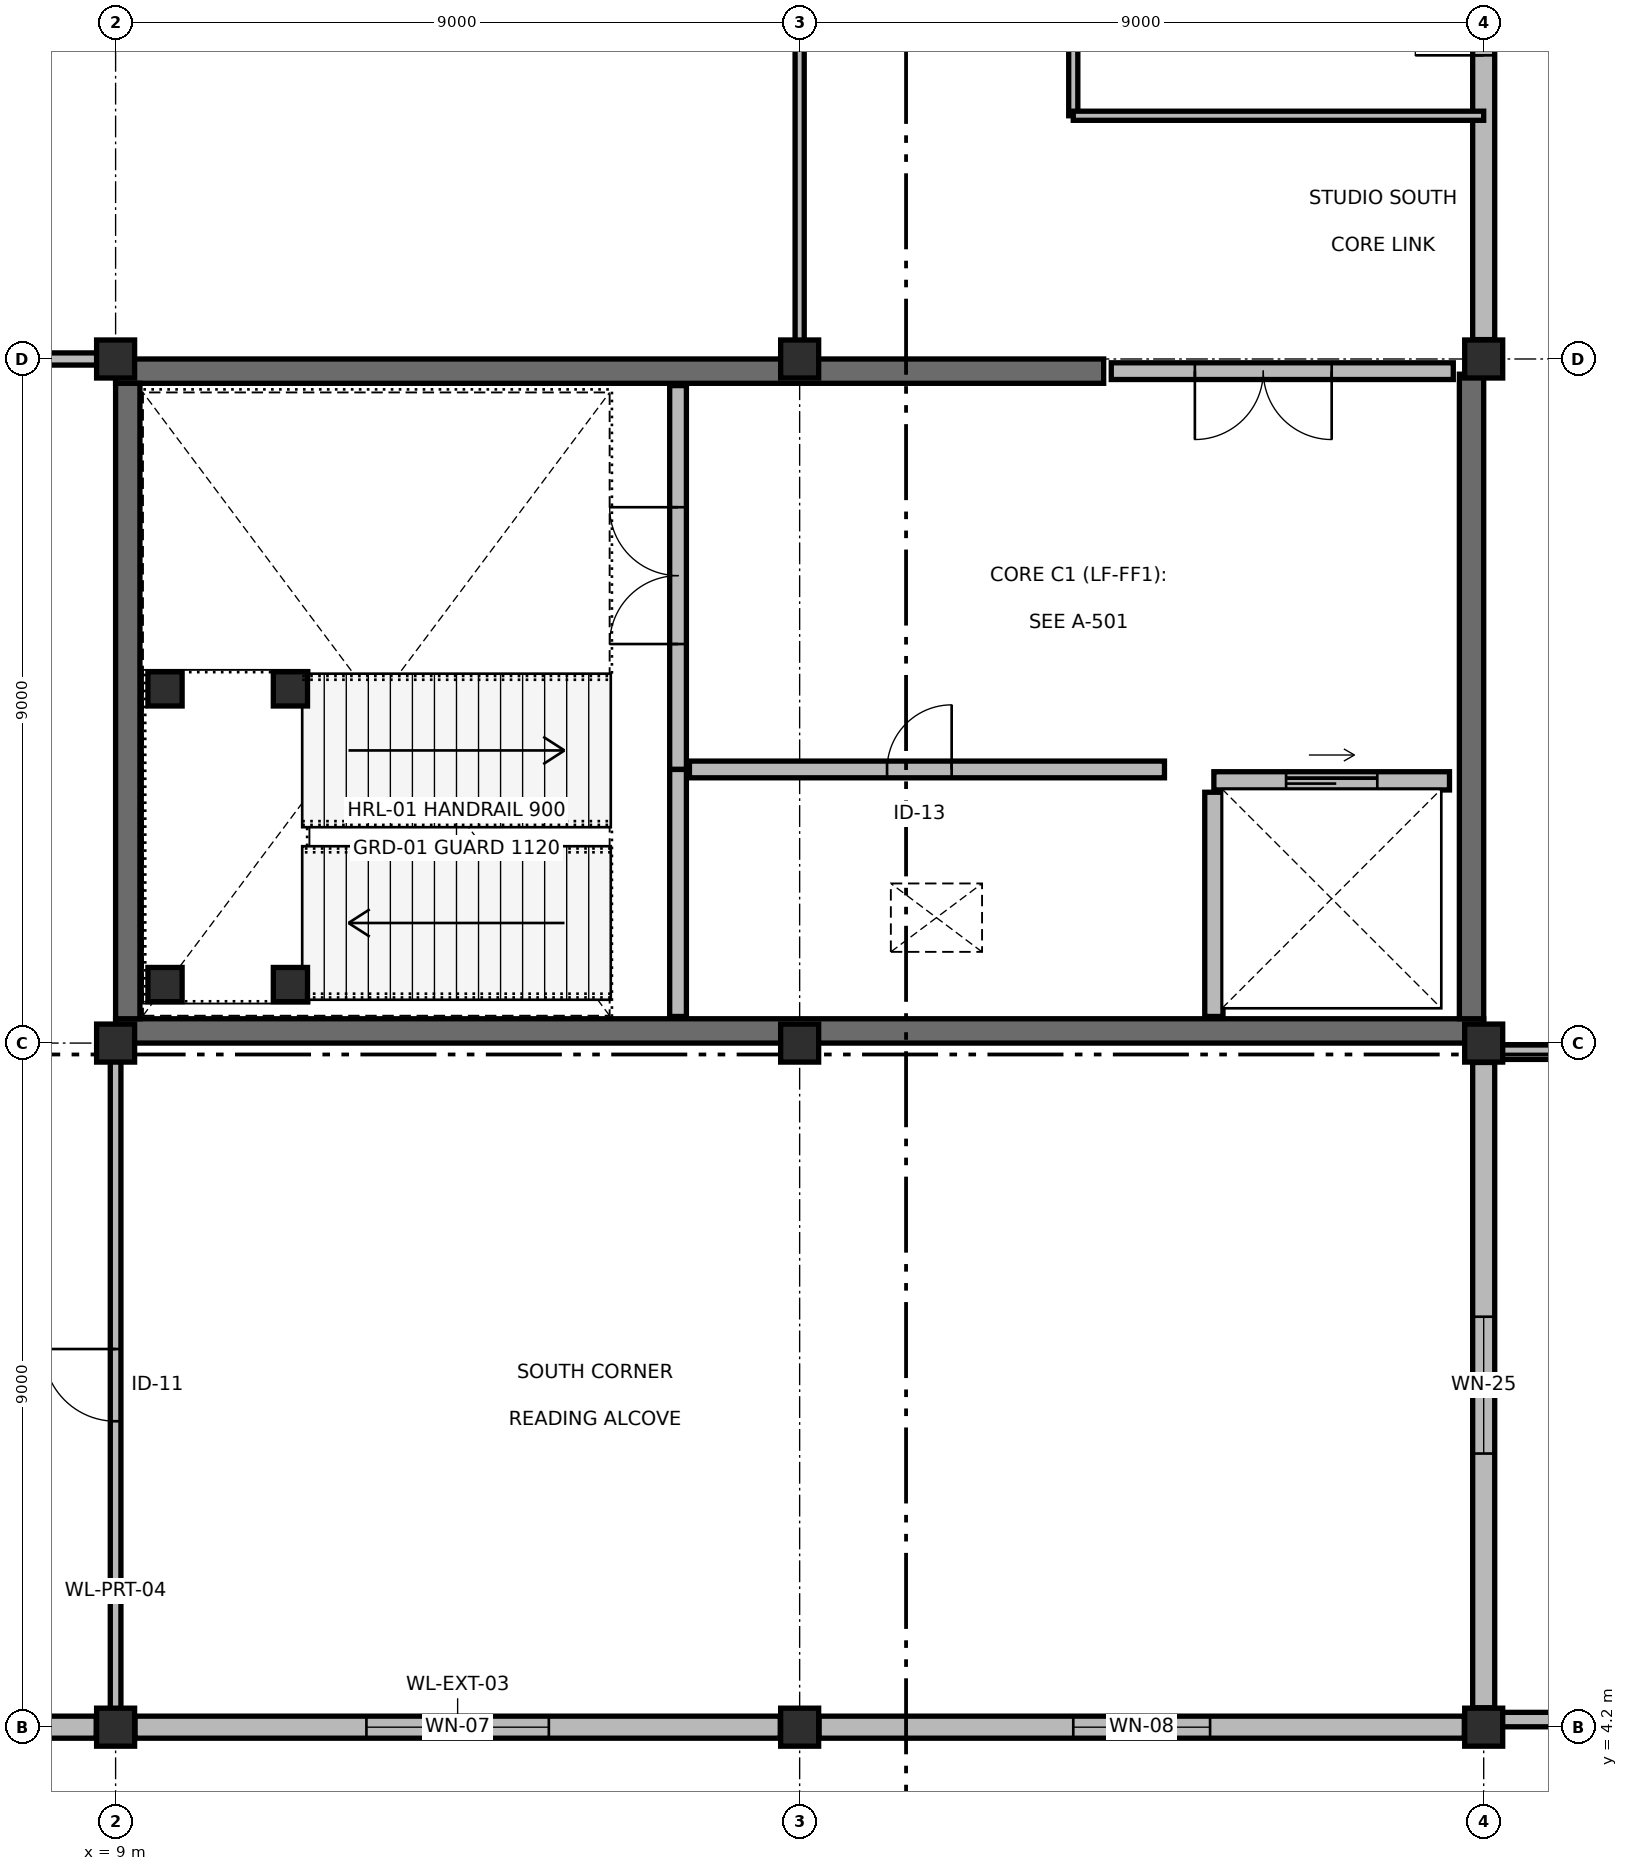
"""IFC4 building model, lengths in metres.
Left out: names, types, materials, properties, quantities, classifications, styles, units other than length and angle.
Written with IfcOpenShell. Run it as: python <this file> out.ifc"""

import sys

from ifc_helpers import new_model, si_unit, direction, frame, frame_2d, origin, origin_2d, place, context, subcontext, project, spatial, rectangle, extrude, element, fill, save


model = new_model("IFC4")
c1 = context("Model", 3, precision=1e-05, world=origin(), true_north=direction((0.0, 1.0)))
c2 = subcontext(c1, "Body", "Model", "MODEL_VIEW")
j1 = project(units=[si_unit("LENGTHUNIT", "METRE"), si_unit("PLANEANGLEUNIT", "RADIAN")], contexts=[c1])
p1 = place(None, origin())
s1 = spatial("IfcSite", under=j1, at=p1, CompositionType="ELEMENT")
p2 = place(p1, origin())
s2 = spatial("IfcBuilding", under=s1, at=p2, CompositionType="ELEMENT")
p3 = place(p2, frame((0.0, 0.0, 14.1)))
s3 = spatial("IfcBuildingStorey", under=s2, at=p3, CompositionType="ELEMENT", Elevation=14.1)
for number, where, z_axis, x_axis in (
    (1, (9.0, 4.2, 0.0), (0.0, 0.0, 1.0), (1.0, 0.0, 0.0)),
    (2, (9.0, 13.2, 0.0), (0.0, 0.0, 1.0), (1.0, 0.0, 0.0)),
    (3, (9.0, 22.2, 0.0), (0.0, 0.0, 1.0), (1.0, 0.0, 0.0)),
    (4, (18.0, 4.2, 0.0), (0.0, 0.0, 1.0), (1.0, 0.0, 0.0)),
    (5, (18.0, 13.2, 0.0), (0.0, 0.0, 1.0), (1.0, 0.0, 0.0)),
    (6, (18.0, 22.2, 0.0), (0.0, 0.0, 1.0), (1.0, 0.0, 0.0)),
    (7, (27.0, 4.2, 0.0), (0.0, 0.0, 1.0), (1.0, 0.0, 0.0)),
    (8, (27.0, 13.2, 0.0), (0.0, 0.0, 1.0), (1.0, 0.0, 0.0)),
    (9, (27.0, 22.2, 0.0), (0.0, 0.0, 1.0), (1.0, 0.0, 0.0)),
):
    element("IfcColumn", number, at=place(p3, frame(where, z_axis=z_axis, x_axis=x_axis)), inside=s3, PredefinedType="COLUMN", context=c2, shape_type="SweptSolid", body=[
        extrude(rectangle(XDim=0.5, YDim=0.5, at=origin_2d()), origin(), (0.0, 0.0, 1.0), 4.5),
    ])
p4 = place(p3, frame((9.0, 13.36, 0.0), z_axis=(0.0, 0.0, 1.0), x_axis=(1.0, 0.0, 0.0)))
e10 = element("IfcWall", 10, at=p4, inside=s3, PredefinedType="SHEAR", context=c2, shape_type="SweptSolid", body=[
    extrude(rectangle(XDim=18.0, YDim=0.32, at=frame_2d((9.0, 0.0))), origin(), (0.0, 0.0, 1.0), 4.5),
])
p5 = place(p3, frame((9.0, 22.04, 0.0), z_axis=(0.0, 0.0, 1.0), x_axis=(1.0, 0.0, 0.0)))
e11 = element("IfcWall", 11, at=p5, inside=s3, PredefinedType="SHEAR", context=c2, shape_type="SweptSolid", body=[
    extrude(rectangle(XDim=13.0, YDim=0.32, at=frame_2d((6.5, 0.0))), origin(), (0.0, 0.0, 1.0), 4.5),
])
p6 = place(p3, frame((9.16, 13.52, 0.0), z_axis=(0.0, 0.0, 1.0), x_axis=(0.0, 1.0, 0.0)))
e12 = element("IfcWall", 12, at=p6, inside=s3, PredefinedType="SHEAR", context=c2, shape_type="SweptSolid", body=[
    extrude(rectangle(XDim=8.36, YDim=0.32, at=frame_2d((4.18, 0.0))), origin(), (0.0, 0.0, 1.0), 4.5),
])
p7 = place(p3, frame((26.84, 13.52, 0.0), z_axis=(0.0, 0.0, 1.0), x_axis=(0.0, 1.0, 0.0)))
e13 = element("IfcWall", 13, at=p7, inside=s3, PredefinedType="SHEAR", context=c2, shape_type="SweptSolid", body=[
    extrude(rectangle(XDim=8.48, YDim=0.32, at=frame_2d((4.24, 0.0))), origin(), (0.0, 0.0, 1.0), 4.5),
])
p8 = place(p3, frame((8.745, 4.2, 0.0), z_axis=(0.0, 0.0, 1.0), x_axis=(-1.0, 0.0, 0.0)))
e14 = element("IfcWall", 14, at=p8, inside=s3, PredefinedType="SOLIDWALL", context=c2, shape_type="SweptSolid", body=[
    extrude(rectangle(XDim=8.49, YDim=0.29, at=frame_2d((4.245, 0.0))), origin(), (0.0, 0.0, 1.0), 3.535),
])
p9 = place(p8, frame((2.745, 0.0, 0.95)))
e15 = element("IfcOpeningElement", 15, at=p9, cuts=e14, PredefinedType="OPENING", context=c2, shape_type="SweptSolid", body=[
    extrude(rectangle(XDim=3.0, YDim=1.2, at=frame_2d((1.5, 0.6))), frame((0.0, 0.155, 0.0), z_axis=(0.0, -1.0, 0.0), x_axis=(1.0, 0.0, 0.0)), (0.0, 0.0, 1.0), 0.31),
])
p10 = place(p3, frame((17.745, 4.2, 0.0), z_axis=(0.0, 0.0, 1.0), x_axis=(-1.0, 0.0, 0.0)))
e16 = element("IfcWall", 16, at=p10, inside=s3, PredefinedType="SOLIDWALL", context=c2, shape_type="SweptSolid", body=[
    extrude(rectangle(XDim=8.49, YDim=0.29, at=frame_2d((4.245, 0.0))), origin(), (0.0, 0.0, 1.0), 3.535),
])
p11 = place(p10, frame((3.045, 0.0, 0.95)))
e17 = element("IfcOpeningElement", 17, at=p11, cuts=e16, PredefinedType="OPENING", context=c2, shape_type="SweptSolid", body=[
    extrude(rectangle(XDim=2.4, YDim=1.2, at=frame_2d((1.2, 0.6))), frame((0.0, 0.155, 0.0), z_axis=(0.0, -1.0, 0.0), x_axis=(1.0, 0.0, 0.0)), (0.0, 0.0, 1.0), 0.31),
])
p12 = place(p3, frame((26.745, 4.2, 0.0), z_axis=(0.0, 0.0, 1.0), x_axis=(-1.0, 0.0, 0.0)))
e18 = element("IfcWall", 18, at=p12, inside=s3, PredefinedType="SOLIDWALL", context=c2, shape_type="SweptSolid", body=[
    extrude(rectangle(XDim=8.49, YDim=0.29, at=frame_2d((4.245, 0.0))), origin(), (0.0, 0.0, 1.0), 3.535),
])
p13 = place(p12, frame((3.345, 0.0, 0.95)))
e19 = element("IfcOpeningElement", 19, at=p13, cuts=e18, PredefinedType="OPENING", context=c2, shape_type="SweptSolid", body=[
    extrude(rectangle(XDim=1.8, YDim=1.2, at=frame_2d((0.9, 0.6))), frame((0.0, 0.155, 0.0), z_axis=(0.0, -1.0, 0.0), x_axis=(1.0, 0.0, 0.0)), (0.0, 0.0, 1.0), 0.31),
])
p14 = place(p3, frame((27.0, 12.945, 0.0), z_axis=(0.0, 0.0, 1.0), x_axis=(0.0, -1.0, 0.0)))
e20 = element("IfcWall", 20, at=p14, inside=s3, PredefinedType="SOLIDWALL", context=c2, shape_type="SweptSolid", body=[
    extrude(rectangle(XDim=8.49, YDim=0.29, at=frame_2d((4.245, 0.0))), origin(), (0.0, 0.0, 1.0), 3.535),
])
p15 = place(p14, frame((3.345, 0.0, 0.85)))
e21 = element("IfcOpeningElement", 21, at=p15, cuts=e20, PredefinedType="OPENING", context=c2, shape_type="SweptSolid", body=[
    extrude(rectangle(XDim=1.8, YDim=2.0, at=frame_2d((0.9, 1.0))), frame((0.0, 0.155, 0.0), z_axis=(0.0, -1.0, 0.0), x_axis=(1.0, 0.0, 0.0)), (0.0, 0.0, 1.0), 0.31),
])
p16 = place(p3, frame((27.0, 28.545, 0.0), z_axis=(0.0, 0.0, 1.0), x_axis=(0.0, -1.0, 0.0)))
e22 = element("IfcWall", 22, at=p16, inside=s3, PredefinedType="SOLIDWALL", context=c2, shape_type="SweptSolid", body=[
    extrude(rectangle(XDim=6.09, YDim=0.29, at=frame_2d((3.045, 0.0))), origin(), (0.0, 0.0, 1.0), 3.535),
])
p17 = place(p16, frame((0.55, 0.0, 0.0)))
e23 = element("IfcOpeningElement", 23, at=p17, cuts=e22, PredefinedType="OPENING", context=c2, shape_type="SweptSolid", body=[
    extrude(rectangle(XDim=1.8, YDim=2.3, at=frame_2d((0.9, 1.15))), frame((0.0, 0.155, 0.0), z_axis=(0.0, -1.0, 0.0), x_axis=(1.0, 0.0, 0.0)), (0.0, 0.0, 1.0), 0.31),
])
for number, where, z_axis, x_axis in (
    (24, (27.15, 13.08, 0.0), (0.0, 0.0, 1.0), (1.0, 0.0, 0.0)),
    (25, (27.15, 4.3, 0.0), (0.0, 0.0, 1.0), (1.0, 0.0, 0.0)),
):
    element("IfcWall", number, at=place(p3, frame(where, z_axis=z_axis, x_axis=x_axis)), inside=s3, PredefinedType="PARAPET", context=c2, shape_type="SweptSolid", body=[
        extrude(rectangle(XDim=8.75, YDim=0.19, at=frame_2d((4.375, 0.0))), origin(), (0.0, 0.0, 1.0), 1.12),
    ])
p18 = place(p3, frame((16.4, 21.85, 0.0), z_axis=(0.0, 0.0, 1.0), x_axis=(0.0, -1.0, 0.0)))
e26 = element("IfcWall", 26, at=p18, inside=s3, PredefinedType="PARTITIONING", context=c2, shape_type="SweptSolid", body=[
    extrude(rectangle(XDim=5.05, YDim=0.22, at=frame_2d((2.525, 0.0))), origin(), (0.0, 0.0, 1.0), 3.585),
])
p19 = place(p18, frame((1.6, 0.0, 0.0)))
e27 = element("IfcOpeningElement", 27, at=p19, cuts=e26, PredefinedType="OPENING", context=c2, shape_type="SweptSolid", body=[
    extrude(rectangle(XDim=1.8, YDim=2.2, at=frame_2d((0.9, 1.1))), frame((0.0, 0.12, 0.0), z_axis=(0.0, -1.0, 0.0), x_axis=(1.0, 0.0, 0.0)), (0.0, 0.0, 1.0), 0.24),
])
p20 = place(p3, frame((16.4, 13.55, 0.0), z_axis=(0.0, 0.0, 1.0), x_axis=(0.0, 1.0, 0.0)))
e28 = element("IfcWall", 28, at=p20, inside=s3, PredefinedType="PARTITIONING", context=c2, shape_type="SweptSolid", body=[
    extrude(rectangle(XDim=3.25, YDim=0.22, at=frame_2d((1.625, 0.0))), origin(), (0.0, 0.0, 1.0), 3.585),
])
p21 = place(p3, frame((16.55, 16.8, 0.0), z_axis=(0.0, 0.0, 1.0), x_axis=(1.0, 0.0, 0.0)))
e29 = element("IfcWall", 29, at=p21, inside=s3, PredefinedType="PARTITIONING", context=c2, shape_type="SweptSolid", body=[
    extrude(rectangle(XDim=6.25, YDim=0.22, at=frame_2d((3.125, 0.0))), origin(), (0.0, 0.0, 1.0), 3.635),
])
p22 = place(p21, frame((2.6, 0.0, 0.0)))
e30 = element("IfcOpeningElement", 30, at=p22, cuts=e29, PredefinedType="OPENING", context=c2, shape_type="SweptSolid", body=[
    extrude(rectangle(XDim=0.85, YDim=2.05, at=frame_2d((0.425, 1.025))), frame((0.0, 0.12, 0.0), z_axis=(0.0, -1.0, 0.0), x_axis=(1.0, 0.0, 0.0)), (0.0, 0.0, 1.0), 0.24),
])
p23 = place(p3, frame((23.45, 16.65, 0.0), z_axis=(0.0, 0.0, 1.0), x_axis=(1.0, 0.0, 0.0)))
e31 = element("IfcWall", 31, at=p23, inside=s3, PredefinedType="SOLIDWALL", context=c2, shape_type="SweptSolid", body=[
    extrude(rectangle(XDim=3.1, YDim=0.24, at=frame_2d((1.55, 0.0))), origin(), (0.0, 0.0, 1.0), 4.205),
])
p24 = place(p23, frame((0.95, 0.0, 0.0)))
e32 = element("IfcOpeningElement", 32, at=p24, cuts=e31, PredefinedType="OPENING", context=c2, shape_type="SweptSolid", body=[
    extrude(rectangle(XDim=1.2, YDim=2.2, at=frame_2d((0.6, 1.1))), frame((0.0, 0.13, 0.0), z_axis=(0.0, -1.0, 0.0), x_axis=(1.0, 0.0, 0.0)), (0.0, 0.0, 1.0), 0.26),
])
p25 = place(p3, frame((23.45, 13.55, 0.0), z_axis=(0.0, 0.0, 1.0), x_axis=(0.0, 1.0, 0.0)))
e33 = element("IfcWall", 33, at=p25, inside=s3, PredefinedType="SOLIDWALL", context=c2, shape_type="SweptSolid", body=[
    extrude(rectangle(XDim=2.95, YDim=0.24, at=frame_2d((1.475, 0.0))), origin(), (0.0, 0.0, 1.0), 3.585),
])
p26 = place(p3, frame((22.1, 22.04, 0.0), z_axis=(0.0, 0.0, 1.0), x_axis=(1.0, 0.0, 0.0)))
e34 = element("IfcWall", 34, at=p26, inside=s3, PredefinedType="PARTITIONING", context=c2, shape_type="SweptSolid", body=[
    extrude(rectangle(XDim=4.5, YDim=0.22, at=frame_2d((2.25, 0.0))), origin(), (0.0, 0.0, 1.0), 3.585),
])
p27 = place(p26, frame((1.1, 0.0, 0.0)))
e35 = element("IfcOpeningElement", 35, at=p27, cuts=e34, PredefinedType="OPENING", context=c2, shape_type="SweptSolid", body=[
    extrude(rectangle(XDim=1.8, YDim=2.2, at=frame_2d((0.9, 1.1))), frame((0.0, 0.12, 0.0), z_axis=(0.0, -1.0, 0.0), x_axis=(1.0, 0.0, 0.0)), (0.0, 0.0, 1.0), 0.24),
])
p28 = place(p3, frame((18.0, 22.2, 0.0), z_axis=(0.0, 0.0, 1.0), x_axis=(0.0, 1.0, 0.0)))
e36 = element("IfcWall", 36, at=p28, inside=s3, PredefinedType="PARTITIONING", context=c2, shape_type="SweptSolid", body=[
    extrude(rectangle(XDim=22.2, YDim=0.12, at=frame_2d((11.1, 0.0))), origin(), (0.0, 0.0, 1.0), 3.485),
])
p29 = place(p28, frame((10.65, 0.0, 0.0)))
e37 = element("IfcOpeningElement", 37, at=p29, cuts=e36, PredefinedType="OPENING", context=c2, shape_type="SweptSolid", body=[
    extrude(rectangle(XDim=0.9, YDim=2.1, at=frame_2d((0.45, 1.05))), frame((0.0, 0.07, 0.0), z_axis=(0.0, -1.0, 0.0), x_axis=(1.0, 0.0, 0.0)), (0.0, 0.0, 1.0), 0.14),
])
p30 = place(p3, frame((0.0, 22.2, 0.0), z_axis=(0.0, 0.0, 1.0), x_axis=(1.0, 0.0, 0.0)))
e38 = element("IfcWall", 38, at=p30, inside=s3, PredefinedType="PARTITIONING", context=c2, shape_type="SweptSolid", body=[
    extrude(rectangle(XDim=9.0, YDim=0.16, at=frame_2d((4.5, 0.0))), origin(), (0.0, 0.0, 1.0), 3.535),
])
p31 = place(p30, frame((3.55, 0.0, 0.0)))
e39 = element("IfcOpeningElement", 39, at=p31, cuts=e38, PredefinedType="OPENING", context=c2, shape_type="SweptSolid", body=[
    extrude(rectangle(XDim=1.9, YDim=2.2, at=frame_2d((0.95, 1.1))), frame((0.0, 0.09, 0.0), z_axis=(0.0, -1.0, 0.0), x_axis=(1.0, 0.0, 0.0)), (0.0, 0.0, 1.0), 0.18),
])
p32 = place(p3, frame((21.6, 25.4, 0.0), z_axis=(0.0, 0.0, 1.0), x_axis=(0.0, 1.0, 0.0)))
e40 = element("IfcWall", 40, at=p32, inside=s3, PredefinedType="PARTITIONING", context=c2, shape_type="SweptSolid", body=[
    extrude(rectangle(XDim=19.0, YDim=0.12, at=frame_2d((9.5, 0.0))), origin(), (0.0, 0.0, 1.0), 3.585),
])
p33 = place(p32, frame((9.05, 0.0, 0.0)))
e41 = element("IfcOpeningElement", 41, at=p33, cuts=e40, PredefinedType="OPENING", context=c2, shape_type="SweptSolid", body=[
    extrude(rectangle(XDim=0.9, YDim=2.1, at=frame_2d((0.45, 1.05))), frame((0.0, 0.07, 0.0), z_axis=(0.0, -1.0, 0.0), x_axis=(1.0, 0.0, 0.0)), (0.0, 0.0, 1.0), 0.14),
])
p34 = place(p3, frame((21.6, 25.4, 0.0), z_axis=(0.0, 0.0, 1.0), x_axis=(1.0, 0.0, 0.0)))
e42 = element("IfcWall", 42, at=p34, inside=s3, PredefinedType="PARTITIONING", context=c2, shape_type="SweptSolid", body=[
    extrude(rectangle(XDim=5.4, YDim=0.12, at=frame_2d((2.7, 0.0))), origin(), (0.0, 0.0, 1.0), 3.535),
])
p35 = place(p3, frame((9.0, 4.2, 0.0), z_axis=(0.0, 0.0, 1.0), x_axis=(0.0, 1.0, 0.0)))
e43 = element("IfcWall", 43, at=p35, inside=s3, PredefinedType="PARTITIONING", context=c2, shape_type="SweptSolid", body=[
    extrude(rectangle(XDim=9.0, YDim=0.14, at=frame_2d((4.5, 0.0))), origin(), (0.0, 0.0, 1.0), 3.535),
])
p36 = place(p35, frame((4.025, 0.0, 0.0)))
e44 = element("IfcOpeningElement", 44, at=p36, cuts=e43, PredefinedType="OPENING", context=c2, shape_type="SweptSolid", body=[
    extrude(rectangle(XDim=0.95, YDim=2.1, at=frame_2d((0.475, 1.05))), frame((0.0, 0.08, 0.0), z_axis=(0.0, -1.0, 0.0), x_axis=(1.0, 0.0, 0.0)), (0.0, 0.0, 1.0), 0.16),
])
for number, where, z_axis, x_axis in (
    (45, (9.65, 13.97, 0.0), (0.0, 0.0, 1.0), (1.0, 0.0, 0.0)),
    (46, (11.3, 13.97, 0.0), (0.0, 0.0, 1.0), (1.0, 0.0, 0.0)),
    (47, (9.65, 17.86, 0.0), (0.0, 0.0, 1.0), (1.0, 0.0, 0.0)),
    (48, (11.3, 17.86, 0.0), (0.0, 0.0, 1.0), (1.0, 0.0, 0.0)),
):
    element("IfcColumn", number, at=place(p3, frame(where, z_axis=z_axis, x_axis=x_axis)), inside=s3, PredefinedType="COLUMN", context=c2, shape_type="SweptSolid", body=[
        extrude(rectangle(XDim=0.45, YDim=0.45, at=origin_2d()), origin(), (0.0, 0.0, 1.0), 4.5),
    ])
p37 = place(p11, origin())
e49 = element("IfcWindow", 49, at=p37, inside=s3, PartitioningType="SINGLE_PANEL", PredefinedType="WINDOW", context=c2, shape_type="SweptSolid", body=[
    extrude(rectangle(XDim=2.4, YDim=1.2, at=frame_2d((1.2, 0.6))), frame((0.0, 0.03, 0.0), z_axis=(0.0, -1.0, 0.0), x_axis=(1.0, 0.0, 0.0)), (0.0, 0.0, 1.0), 0.06),
])
fill(e17, e49)
p38 = place(p13, origin())
e50 = element("IfcWindow", 50, at=p38, inside=s3, PartitioningType="SINGLE_PANEL", PredefinedType="WINDOW", context=c2, shape_type="SweptSolid", body=[
    extrude(rectangle(XDim=1.8, YDim=1.2, at=frame_2d((0.9, 0.6))), frame((0.0, 0.03, 0.0), z_axis=(0.0, -1.0, 0.0), x_axis=(1.0, 0.0, 0.0)), (0.0, 0.0, 1.0), 0.06),
])
fill(e19, e50)
p39 = place(p15, origin())
e51 = element("IfcWindow", 51, at=p39, inside=s3, PartitioningType="SINGLE_PANEL", PredefinedType="WINDOW", context=c2, shape_type="SweptSolid", body=[
    extrude(rectangle(XDim=1.8, YDim=2.0, at=frame_2d((0.9, 1.0))), frame((0.0, 0.03, 0.0), z_axis=(0.0, -1.0, 0.0), x_axis=(1.0, 0.0, 0.0)), (0.0, 0.0, 1.0), 0.06),
])
fill(e21, e51)
p40 = place(p17, origin())
e52 = element("IfcDoor", 52, at=p40, inside=s3, OperationType="DOUBLE_DOOR_SINGLE_SWING", PredefinedType="DOOR", context=c2, shape_type="SweptSolid", body=[
    extrude(rectangle(XDim=1.8, YDim=2.3, at=frame_2d((0.9, 1.15))), frame((0.0, 0.025, 0.0), z_axis=(0.0, -1.0, 0.0), x_axis=(1.0, 0.0, 0.0)), (0.0, 0.0, 1.0), 0.05),
])
fill(e23, e52)
p41 = place(p19, origin())
e53 = element("IfcDoor", 53, at=p41, inside=s3, OperationType="DOUBLE_DOOR_SINGLE_SWING", PredefinedType="DOOR", context=c2, shape_type="SweptSolid", body=[
    extrude(rectangle(XDim=1.8, YDim=2.2, at=frame_2d((0.9, 1.1))), frame((0.0, 0.025, 0.0), z_axis=(0.0, -1.0, 0.0), x_axis=(1.0, 0.0, 0.0)), (0.0, 0.0, 1.0), 0.05),
])
fill(e27, e53)
p42 = place(p22, origin())
e54 = element("IfcDoor", 54, at=p42, inside=s3, OperationType="SINGLE_SWING_RIGHT", PredefinedType="DOOR", context=c2, shape_type="SweptSolid", body=[
    extrude(rectangle(XDim=0.85, YDim=2.05, at=frame_2d((0.425, 1.025))), frame((0.0, 0.025, 0.0), z_axis=(0.0, -1.0, 0.0), x_axis=(1.0, 0.0, 0.0)), (0.0, 0.0, 1.0), 0.05),
])
fill(e30, e54)
p43 = place(p24, origin())
e55 = element("IfcDoor", 55, at=p43, inside=s3, OperationType="DOUBLE_DOOR_SLIDING", PredefinedType="DOOR", context=c2, shape_type="SweptSolid", body=[
    extrude(rectangle(XDim=1.2, YDim=2.2, at=frame_2d((0.6, 1.1))), frame((0.0, 0.025, 0.0), z_axis=(0.0, -1.0, 0.0), x_axis=(1.0, 0.0, 0.0)), (0.0, 0.0, 1.0), 0.05),
])
fill(e32, e55)
p44 = place(p27, origin())
e56 = element("IfcDoor", 56, at=p44, inside=s3, OperationType="DOUBLE_DOOR_SINGLE_SWING", PredefinedType="DOOR", context=c2, shape_type="SweptSolid", body=[
    extrude(rectangle(XDim=1.8, YDim=2.2, at=frame_2d((0.9, 1.1))), frame((0.0, 0.025, 0.0), z_axis=(0.0, -1.0, 0.0), x_axis=(1.0, 0.0, 0.0)), (0.0, 0.0, 1.0), 0.05),
])
fill(e35, e56)
p45 = place(p36, origin())
e57 = element("IfcDoor", 57, at=p45, inside=s3, OperationType="SINGLE_SWING_RIGHT", PredefinedType="DOOR", context=c2, shape_type="SweptSolid", body=[
    extrude(rectangle(XDim=0.95, YDim=2.1, at=frame_2d((0.475, 1.05))), frame((0.0, 0.025, 0.0), z_axis=(0.0, -1.0, 0.0), x_axis=(1.0, 0.0, 0.0)), (0.0, 0.0, 1.0), 0.05),
])
fill(e44, e57)
save(model, sys.argv[1])
